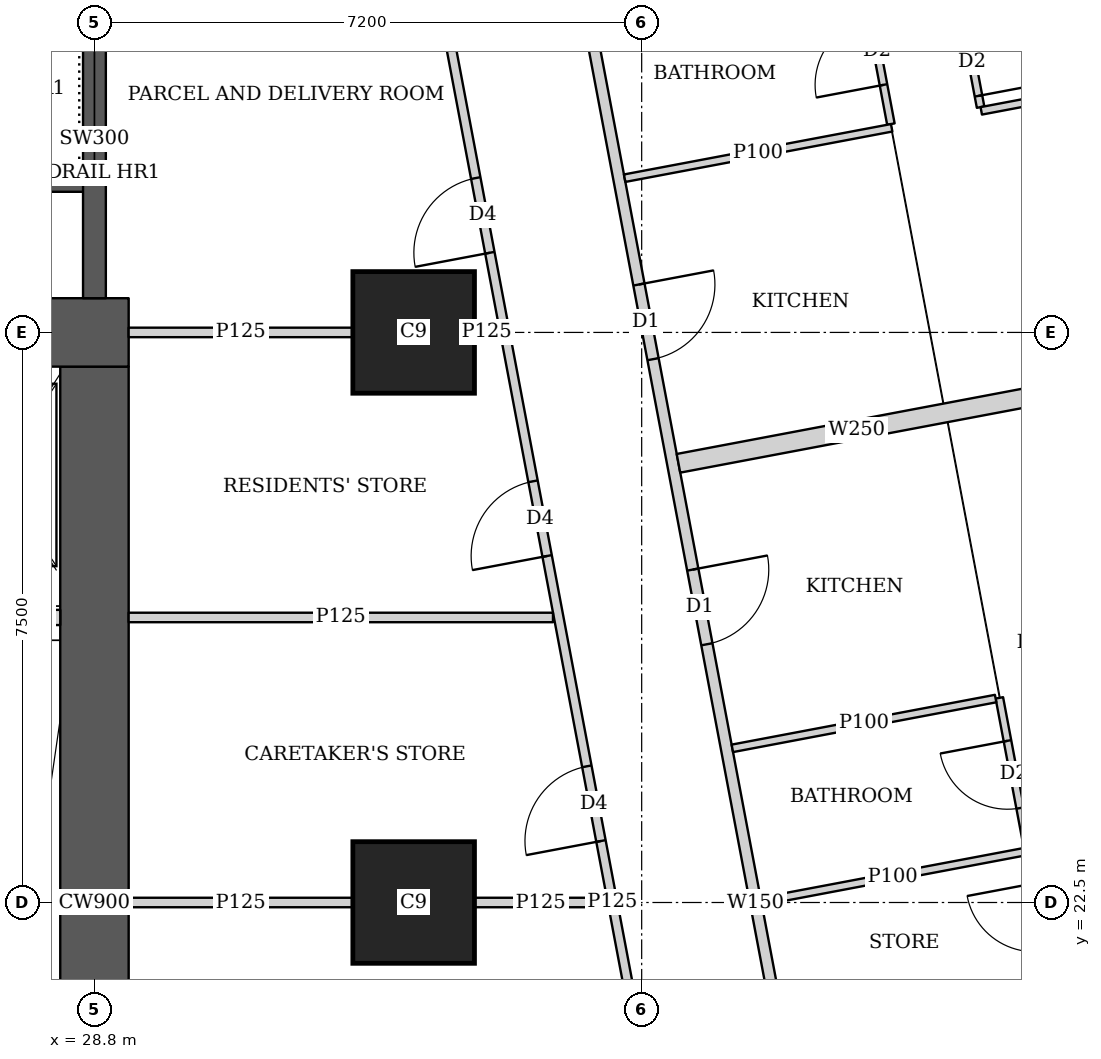
"""IFC4 building model, lengths in metres.
Left out: names, types, materials, properties, quantities, classifications, styles, units other than length and angle.
Written with IfcOpenShell. Run it as: python <this file> out.ifc"""

import sys

from ifc_helpers import new_model, si_unit, direction, frame, frame_2d, origin, origin_2d, place, context, subcontext, project, spatial, rectangle, extrude, element, fill, save


model = new_model("IFC4")
c1 = context("Model", 3, precision=1e-05, world=origin(), true_north=direction((0.0, 1.0)))
c2 = subcontext(c1, "Body", "Model", "MODEL_VIEW")
j1 = project(units=[si_unit("LENGTHUNIT", "METRE"), si_unit("PLANEANGLEUNIT", "RADIAN")], contexts=[c1])
p1 = place(None, origin())
s1 = spatial("IfcSite", under=j1, at=p1, CompositionType="ELEMENT")
p2 = place(p1, origin())
s2 = spatial("IfcBuilding", under=s1, at=p2, CompositionType="ELEMENT")
p3 = place(p2, frame((0.0, 0.0, 89.15)))
s3 = spatial("IfcBuildingStorey", under=s2, at=p3, CompositionType="ELEMENT", Elevation=89.15)
for number, where, z_axis, x_axis in (
    (1, (33.0, 22.5, 0.0), (0.0, 0.0, 1.0), (1.0, 0.0, 0.0)),
    (2, (33.0, 30.0, 0.0), (0.0, 0.0, 1.0), (1.0, 0.0, 0.0)),
):
    element("IfcColumn", number, at=place(p3, frame(where, z_axis=z_axis, x_axis=x_axis)), inside=s3, PredefinedType="COLUMN", context=c2, shape_type="SweptSolid", body=[
        extrude(rectangle(XDim=1.6, YDim=1.6, at=origin_2d()), origin(), (0.0, 0.0, 1.0), 3.75),
    ])
p4 = place(p3, frame((13.95, 30.0, 0.0), z_axis=(0.0, 0.0, 1.0), x_axis=(1.0, 0.0, 0.0)))
e3 = element("IfcWall", 3, at=p4, inside=s3, PredefinedType="SHEAR", context=c2, shape_type="SweptSolid", body=[
    extrude(rectangle(XDim=15.3, YDim=0.9, at=frame_2d((7.65, 0.0))), origin(), (0.0, 0.0, 1.0), 3.75),
])
p5 = place(p4, frame((4.45, 0.0, 0.0)))
e4 = element("IfcOpeningElement", 4, at=p5, cuts=e3, PredefinedType="OPENING", context=c2, shape_type="SweptSolid", body=[
    extrude(rectangle(XDim=1.8, YDim=2.1, at=frame_2d((0.9, 1.05))), frame((0.0, 0.46, 0.0), z_axis=(0.0, -1.0, 0.0), x_axis=(1.0, 0.0, 0.0)), (0.0, 0.0, 1.0), 0.92),
])
p6 = place(p4, frame((10.7, 0.0, 0.0)))
e5 = element("IfcOpeningElement", 5, at=p6, cuts=e3, PredefinedType="OPENING", context=c2, shape_type="SweptSolid", body=[
    extrude(rectangle(XDim=1.1, YDim=2.1, at=frame_2d((0.55, 1.05))), frame((0.0, 0.46, 0.0), z_axis=(0.0, -1.0, 0.0), x_axis=(1.0, 0.0, 0.0)), (0.0, 0.0, 1.0), 0.92),
])
p7 = place(p3, frame((28.8, 15.45, 0.0), z_axis=(0.0, 0.0, 1.0), x_axis=(0.0, 1.0, 0.0)))
e6 = element("IfcWall", 6, at=p7, inside=s3, PredefinedType="SHEAR", context=c2, shape_type="SweptSolid", body=[
    extrude(rectangle(XDim=14.1, YDim=0.9, at=frame_2d((7.05, 0.0))), origin(), (0.0, 0.0, 1.0), 3.75),
])
p8 = place(p3, frame((28.8, 30.45, 0.0), z_axis=(0.0, 0.0, 1.0), x_axis=(0.0, 1.0, 0.0)))
e7 = element("IfcWall", 7, at=p8, inside=s3, PredefinedType="SHEAR", context=c2, shape_type="SweptSolid", body=[
    extrude(rectangle(XDim=4.2, YDim=0.3, at=frame_2d((2.1, 0.0))), origin(), (0.0, 0.0, 1.0), 3.75),
])
p9 = place(p3, frame((33.127, 45.65, 0.0), z_axis=(0.0, 0.0, 1.0), x_axis=(0.185598547723, -0.98262565562, 0.0)))
e8 = element("IfcWall", 8, at=p9, inside=s3, PredefinedType="SOLIDWALL", context=c2, shape_type="SweptSolid", body=[
    extrude(rectangle(XDim=47.118, YDim=0.15, at=frame_2d((23.559, 0.0))), origin(), (0.0, 0.0, 1.0), 2.2),
])
p10 = place(p9, frame((15.285, 0.0, 0.0)))
e9 = element("IfcOpeningElement", 9, at=p10, cuts=e8, PredefinedType="OPENING", context=c2, shape_type="SweptSolid", body=[
    extrude(rectangle(XDim=1.0, YDim=2.1, at=frame_2d((0.5, 1.05))), frame((0.0, 0.085, 0.0), z_axis=(0.0, -1.0, 0.0), x_axis=(1.0, 0.0, 0.0)), (0.0, 0.0, 1.0), 0.17),
])
p11 = place(p9, frame((19.102, 0.0, 0.0)))
e10 = element("IfcOpeningElement", 10, at=p11, cuts=e8, PredefinedType="OPENING", context=c2, shape_type="SweptSolid", body=[
    extrude(rectangle(XDim=1.0, YDim=2.1, at=frame_2d((0.5, 1.05))), frame((0.0, 0.085, 0.0), z_axis=(0.0, -1.0, 0.0), x_axis=(1.0, 0.0, 0.0)), (0.0, 0.0, 1.0), 0.17),
])
p12 = place(p9, frame((33.88, 0.0, 0.0)))
e11 = element("IfcOpeningElement", 11, at=p12, cuts=e8, PredefinedType="OPENING", context=c2, shape_type="SweptSolid", body=[
    extrude(rectangle(XDim=1.0, YDim=2.1, at=frame_2d((0.5, 1.05))), frame((0.0, 0.085, 0.0), z_axis=(0.0, -1.0, 0.0), x_axis=(1.0, 0.0, 0.0)), (0.0, 0.0, 1.0), 0.17),
])
p13 = place(p3, frame((38.862, 41.42, 0.0), z_axis=(0.0, 0.0, 1.0), x_axis=(0.185574815416, -0.982630137887, 0.0)))
e12 = element("IfcWall", 12, at=p13, inside=s3, PredefinedType="PARTITIONING", context=c2, shape_type="SweptSolid", body=[
    extrude(rectangle(XDim=8.605, YDim=0.1, at=frame_2d((4.303, 0.0))), origin(), (0.0, 0.0, 1.0), 3.5),
])
p14 = place(p13, frame((7.555, 0.0, 0.0)))
e13 = element("IfcOpeningElement", 13, at=p14, cuts=e12, PredefinedType="OPENING", context=c2, shape_type="SweptSolid", body=[
    extrude(rectangle(XDim=0.9, YDim=2.1, at=frame_2d((0.45, 1.05))), frame((0.0, 0.06, 0.0), z_axis=(0.0, -1.0, 0.0), x_axis=(1.0, 0.0, 0.0)), (0.0, 0.0, 1.0), 0.12),
])
p15 = place(p13, frame((3.579, 0.0, 0.0)))
e14 = element("IfcOpeningElement", 14, at=p15, cuts=e12, PredefinedType="OPENING", context=c2, shape_type="SweptSolid", body=[
    extrude(rectangle(XDim=0.9, YDim=2.1, at=frame_2d((0.45, 1.05))), frame((0.0, 0.06, 0.0), z_axis=(0.0, -1.0, 0.0), x_axis=(1.0, 0.0, 0.0)), (0.0, 0.0, 1.0), 0.12),
])
p16 = place(p3, frame((37.473, 42.309, 0.0), z_axis=(0.0, 0.0, 1.0), x_axis=(0.185491912953, -0.982645790827, 0.0)))
e15 = element("IfcWall", 15, at=p16, inside=s3, PredefinedType="PARTITIONING", context=c2, shape_type="SweptSolid", body=[
    extrude(rectangle(XDim=9.737, YDim=0.1, at=frame_2d((4.869, 0.0))), origin(), (0.0, 0.0, 1.0), 3.5),
])
p17 = place(p16, frame((8.312, 0.0, 0.0)))
e16 = element("IfcOpeningElement", 16, at=p17, cuts=e15, PredefinedType="OPENING", context=c2, shape_type="SweptSolid", body=[
    extrude(rectangle(XDim=0.9, YDim=2.1, at=frame_2d((0.45, 1.05))), frame((0.0, 0.06, 0.0), z_axis=(0.0, -1.0, 0.0), x_axis=(1.0, 0.0, 0.0)), (0.0, 0.0, 1.0), 0.12),
])
p18 = place(p16, frame((2.853, 0.0, 0.0)))
e17 = element("IfcOpeningElement", 17, at=p18, cuts=e15, PredefinedType="OPENING", context=c2, shape_type="SweptSolid", body=[
    extrude(rectangle(XDim=0.9, YDim=2.1, at=frame_2d((0.45, 1.05))), frame((0.0, 0.06, 0.0), z_axis=(0.0, -1.0, 0.0), x_axis=(1.0, 0.0, 0.0)), (0.0, 0.0, 1.0), 0.12),
])
p19 = place(p16, frame((5.644, 0.0, 0.0)))
e18 = element("IfcOpeningElement", 18, at=p19, cuts=e15, PredefinedType="OPENING", context=c2, shape_type="SweptSolid", body=[
    extrude(rectangle(XDim=0.9, YDim=2.1, at=frame_2d((0.45, 1.05))), frame((0.0, 0.06, 0.0), z_axis=(0.0, -1.0, 0.0), x_axis=(1.0, 0.0, 0.0)), (0.0, 0.0, 1.0), 0.12),
])
p20 = place(p3, frame((44.693, 33.713, 0.0), z_axis=(0.0, 0.0, 1.0), x_axis=(-0.982633535512, -0.185556823879, 0.0)))
e19 = element("IfcWall", 19, at=p20, inside=s3, PredefinedType="PARTITIONING", context=c2, shape_type="SweptSolid", body=[
    extrude(rectangle(XDim=4.3, YDim=0.1, at=frame_2d((2.15, 0.0))), origin(), (0.0, 0.0, 1.0), 2.2),
])
p21 = place(p3, frame((39.289, 32.692, 0.0), z_axis=(0.0, 0.0, 1.0), x_axis=(-0.982662827464, -0.185401638399, 0.0)))
e20 = element("IfcWall", 20, at=p21, inside=s3, PredefinedType="PARTITIONING", context=c2, shape_type="SweptSolid", body=[
    extrude(rectangle(XDim=3.575, YDim=0.1, at=frame_2d((1.788, 0.0))), origin(), (0.0, 0.0, 1.0), 3.5),
])
p22 = place(p3, frame((40.706, 25.192, 0.0), z_axis=(0.0, 0.0, 1.0), x_axis=(0.185591412258, -0.982627003342, 0.0)))
e21 = element("IfcWall", 21, at=p22, inside=s3, PredefinedType="PARTITIONING", context=c2, shape_type="SweptSolid", body=[
    extrude(rectangle(XDim=9.548, YDim=0.1, at=frame_2d((4.774, 0.0))), origin(), (0.0, 0.0, 1.0), 2.5),
])
p23 = place(p22, frame((0.575, 0.0, 0.0)))
e22 = element("IfcOpeningElement", 22, at=p23, cuts=e21, PredefinedType="OPENING", context=c2, shape_type="SweptSolid", body=[
    extrude(rectangle(XDim=0.9, YDim=2.1, at=frame_2d((0.45, 1.05))), frame((0.0, 0.06, 0.0), z_axis=(0.0, -1.0, 0.0), x_axis=(1.0, 0.0, 0.0)), (0.0, 0.0, 1.0), 0.12),
])
p24 = place(p22, frame((4.166, 0.0, 0.0)))
e23 = element("IfcOpeningElement", 23, at=p24, cuts=e21, PredefinedType="OPENING", context=c2, shape_type="SweptSolid", body=[
    extrude(rectangle(XDim=0.9, YDim=2.1, at=frame_2d((0.45, 1.05))), frame((0.0, 0.06, 0.0), z_axis=(0.0, -1.0, 0.0), x_axis=(1.0, 0.0, 0.0)), (0.0, 0.0, 1.0), 0.12),
])
p25 = place(p22, frame((2.483, 0.0, 0.0)))
e24 = element("IfcOpeningElement", 24, at=p25, cuts=e21, PredefinedType="OPENING", context=c2, shape_type="SweptSolid", body=[
    extrude(rectangle(XDim=0.9, YDim=2.1, at=frame_2d((0.45, 1.05))), frame((0.0, 0.06, 0.0), z_axis=(0.0, -1.0, 0.0), x_axis=(1.0, 0.0, 0.0)), (0.0, 0.0, 1.0), 0.12),
])
p26 = place(p22, frame((6.074, 0.0, 0.0)))
e25 = element("IfcOpeningElement", 25, at=p26, cuts=e21, PredefinedType="OPENING", context=c2, shape_type="SweptSolid", body=[
    extrude(rectangle(XDim=0.9, YDim=2.1, at=frame_2d((0.45, 1.05))), frame((0.0, 0.06, 0.0), z_axis=(0.0, -1.0, 0.0), x_axis=(1.0, 0.0, 0.0)), (0.0, 0.0, 1.0), 0.12),
])
p27 = place(p3, frame((40.657, 25.183, 0.0), z_axis=(0.0, 0.0, 1.0), x_axis=(-0.982585626838, -0.185810349366, 0.0)))
e26 = element("IfcWall", 26, at=p27, inside=s3, PredefinedType="PARTITIONING", context=c2, shape_type="SweptSolid", body=[
    extrude(rectangle(XDim=3.525, YDim=0.1, at=frame_2d((1.763, 0.0))), origin(), (0.0, 0.0, 1.0), 3.5),
])
p28 = place(p3, frame((41.037, 23.168, 0.0), z_axis=(0.0, 0.0, 1.0), x_axis=(-0.982638553676, -0.185530247748, 0.0)))
e27 = element("IfcWall", 27, at=p28, inside=s3, PredefinedType="PARTITIONING", context=c2, shape_type="SweptSolid", body=[
    extrude(rectangle(XDim=3.525, YDim=0.1, at=frame_2d((1.763, 0.0))), origin(), (0.0, 0.0, 1.0), 2.5),
])
p29 = place(p3, frame((41.177, 29.164, 0.0), z_axis=(0.0, 0.0, 1.0), x_axis=(-0.982642846239, -0.185507511263, 0.0)))
e28 = element("IfcWall", 28, at=p29, inside=s3, PredefinedType="SOLIDWALL", context=c2, shape_type="SweptSolid", body=[
    extrude(rectangle(XDim=4.776, YDim=0.25, at=frame_2d((2.388, 0.0))), origin(), (0.0, 0.0, 1.0), 2.5),
])
p30 = place(p3, frame((37.9, 10.413, 0.0), z_axis=(0.0, 0.0, 1.0), x_axis=(-0.185589740669, 0.982627319058, 0.0)))
e29 = element("IfcWall", 29, at=p30, inside=s3, PredefinedType="PARTITIONING", context=c2, shape_type="SweptSolid", body=[
    extrude(rectangle(XDim=24.602, YDim=0.125, at=frame_2d((12.301, 0.0))), origin(), (0.0, 0.0, 1.0), 2.5),
])
p31 = place(p30, frame((0.708, 0.0, 0.0)))
e30 = element("IfcOpeningElement", 30, at=p31, cuts=e29, PredefinedType="OPENING", context=c2, shape_type="SweptSolid", body=[
    extrude(rectangle(XDim=1.0, YDim=2.1, at=frame_2d((0.5, 1.05))), frame((0.0, 0.073, 0.0), z_axis=(0.0, -1.0, 0.0), x_axis=(1.0, 0.0, 0.0)), (0.0, 0.0, 1.0), 0.145),
])
p32 = place(p30, frame((5.75, 0.0, 0.0)))
e31 = element("IfcOpeningElement", 31, at=p32, cuts=e29, PredefinedType="OPENING", context=c2, shape_type="SweptSolid", body=[
    extrude(rectangle(XDim=1.0, YDim=2.1, at=frame_2d((0.5, 1.05))), frame((0.0, 0.073, 0.0), z_axis=(0.0, -1.0, 0.0), x_axis=(1.0, 0.0, 0.0)), (0.0, 0.0, 1.0), 0.145),
])
p33 = place(p30, frame((13.124, 0.0, 0.0)))
e32 = element("IfcOpeningElement", 32, at=p33, cuts=e29, PredefinedType="OPENING", context=c2, shape_type="SweptSolid", body=[
    extrude(rectangle(XDim=1.0, YDim=2.1, at=frame_2d((0.5, 1.05))), frame((0.0, 0.073, 0.0), z_axis=(0.0, -1.0, 0.0), x_axis=(1.0, 0.0, 0.0)), (0.0, 0.0, 1.0), 0.145),
])
p34 = place(p30, frame((16.94, 0.0, 0.0)))
e33 = element("IfcOpeningElement", 33, at=p34, cuts=e29, PredefinedType="OPENING", context=c2, shape_type="SweptSolid", body=[
    extrude(rectangle(XDim=1.0, YDim=2.1, at=frame_2d((0.5, 1.05))), frame((0.0, 0.073, 0.0), z_axis=(0.0, -1.0, 0.0), x_axis=(1.0, 0.0, 0.0)), (0.0, 0.0, 1.0), 0.145),
])
p35 = place(p30, frame((21.0, 0.0, 0.0)))
e34 = element("IfcOpeningElement", 34, at=p35, cuts=e29, PredefinedType="OPENING", context=c2, shape_type="SweptSolid", body=[
    extrude(rectangle(XDim=1.0, YDim=2.1, at=frame_2d((0.5, 1.05))), frame((0.0, 0.073, 0.0), z_axis=(0.0, -1.0, 0.0), x_axis=(1.0, 0.0, 0.0)), (0.0, 0.0, 1.0), 0.145),
])
p36 = place(p3, frame((29.25, 22.5, 0.0), z_axis=(0.0, 0.0, 1.0), x_axis=(1.0, 0.0, 0.0)))
e35 = element("IfcWall", 35, at=p36, inside=s3, PredefinedType="PARTITIONING", context=c2, shape_type="SweptSolid", body=[
    extrude(rectangle(XDim=2.949, YDim=0.125, at=frame_2d((1.475, 0.0))), origin(), (0.0, 0.0, 1.0), 3.5),
])
p37 = place(p3, frame((33.801, 22.5, 0.0), z_axis=(0.0, 0.0, 1.0), x_axis=(1.0, 0.0, 0.0)))
e36 = element("IfcWall", 36, at=p37, inside=s3, PredefinedType="PARTITIONING", context=c2, shape_type="SweptSolid", body=[
    extrude(rectangle(XDim=1.741, YDim=0.125, at=frame_2d((0.871, 0.0))), origin(), (0.0, 0.0, 1.0), 2.5),
])
p38 = place(p3, frame((29.25, 26.25, 0.0), z_axis=(0.0, 0.0, 1.0), x_axis=(1.0, 0.0, 0.0)))
e37 = element("IfcWall", 37, at=p38, inside=s3, PredefinedType="PARTITIONING", context=c2, shape_type="SweptSolid", body=[
    extrude(rectangle(XDim=5.583, YDim=0.125, at=frame_2d((2.792, 0.0))), origin(), (0.0, 0.0, 1.0), 3.5),
])
p39 = place(p3, frame((29.25, 30.0, 0.0), z_axis=(0.0, 0.0, 1.0), x_axis=(1.0, 0.0, 0.0)))
e38 = element("IfcWall", 38, at=p39, inside=s3, PredefinedType="PARTITIONING", context=c2, shape_type="SweptSolid", body=[
    extrude(rectangle(XDim=2.949, YDim=0.125, at=frame_2d((1.475, 0.0))), origin(), (0.0, 0.0, 1.0), 3.5),
])
p40 = place(p3, frame((33.801, 30.0, 0.0), z_axis=(0.0, 0.0, 1.0), x_axis=(1.0, 0.0, 0.0)))
e39 = element("IfcWall", 39, at=p40, inside=s3, PredefinedType="PARTITIONING", context=c2, shape_type="SweptSolid", body=[
    extrude(rectangle(XDim=0.324, YDim=0.125, at=frame_2d((0.162, 0.0))), origin(), (0.0, 0.0, 1.0), 2.5),
])
p41 = place(p3, frame((23.0, 31.95, 0.0), z_axis=(0.0, 0.0, 1.0), x_axis=(1.0, 0.0, 0.0)))
e40 = element("IfcWall", 40, at=p41, inside=s3, PredefinedType="SHEAR", context=c2, shape_type="SweptSolid", body=[
    extrude(rectangle(XDim=5.8, YDim=0.2, at=frame_2d((2.9, 0.0))), origin(), (0.0, 0.0, 1.0), 3.75),
])
p42 = place(p3, frame((27.4, 26.25, 0.0), z_axis=(0.0, 0.0, 1.0), x_axis=(1.0, 0.0, 0.0)))
e41 = element("IfcWall", 41, at=p42, inside=s3, PredefinedType="SOLIDWALL", context=c2, shape_type="SweptSolid", body=[
    extrude(rectangle(XDim=0.95, YDim=0.2, at=frame_2d((0.475, 0.0))), origin(), (0.0, 0.0, 1.0), 3.5),
])
p43 = place(p14, origin())
e42 = element("IfcDoor", 42, at=p43, inside=s3, OperationType="SINGLE_SWING_RIGHT", PredefinedType="DOOR", context=c2, shape_type="SweptSolid", body=[
    extrude(rectangle(XDim=0.9, YDim=2.1, at=frame_2d((0.45, 1.05))), frame((0.0, 0.025, 0.0), z_axis=(0.0, -1.0, 0.0), x_axis=(1.0, 0.0, 0.0)), (0.0, 0.0, 1.0), 0.05),
])
fill(e13, e42)
p44 = place(p17, origin())
e43 = element("IfcDoor", 43, at=p44, inside=s3, OperationType="SINGLE_SWING_LEFT", PredefinedType="DOOR", context=c2, shape_type="SweptSolid", body=[
    extrude(rectangle(XDim=0.9, YDim=2.1, at=frame_2d((0.45, 1.05))), frame((0.0, 0.025, 0.0), z_axis=(0.0, -1.0, 0.0), x_axis=(1.0, 0.0, 0.0)), (0.0, 0.0, 1.0), 0.05),
])
fill(e16, e43)
p45 = place(p10, origin())
e44 = element("IfcDoor", 44, at=p45, inside=s3, OperationType="SINGLE_SWING_LEFT", PredefinedType="DOOR", context=c2, shape_type="SweptSolid", body=[
    extrude(rectangle(XDim=1.0, YDim=2.1, at=frame_2d((0.5, 1.05))), frame((0.0, 0.025, 0.0), z_axis=(0.0, -1.0, 0.0), x_axis=(1.0, 0.0, 0.0)), (0.0, 0.0, 1.0), 0.05),
])
fill(e9, e44)
p46 = place(p23, origin())
e45 = element("IfcDoor", 45, at=p46, inside=s3, OperationType="SINGLE_SWING_RIGHT", PredefinedType="DOOR", context=c2, shape_type="SweptSolid", body=[
    extrude(rectangle(XDim=0.9, YDim=2.1, at=frame_2d((0.45, 1.05))), frame((0.0, 0.025, 0.0), z_axis=(0.0, -1.0, 0.0), x_axis=(1.0, 0.0, 0.0)), (0.0, 0.0, 1.0), 0.05),
])
fill(e22, e45)
p47 = place(p11, origin())
e46 = element("IfcDoor", 46, at=p47, inside=s3, OperationType="SINGLE_SWING_LEFT", PredefinedType="DOOR", context=c2, shape_type="SweptSolid", body=[
    extrude(rectangle(XDim=1.0, YDim=2.1, at=frame_2d((0.5, 1.05))), frame((0.0, 0.025, 0.0), z_axis=(0.0, -1.0, 0.0), x_axis=(1.0, 0.0, 0.0)), (0.0, 0.0, 1.0), 0.05),
])
fill(e10, e46)
p48 = place(p33, origin())
e47 = element("IfcDoor", 47, at=p48, inside=s3, OperationType="SINGLE_SWING_LEFT", PredefinedType="DOOR", context=c2, shape_type="SweptSolid", body=[
    extrude(rectangle(XDim=1.0, YDim=2.1, at=frame_2d((0.5, 1.05))), frame((0.0, 0.025, 0.0), z_axis=(0.0, -1.0, 0.0), x_axis=(1.0, 0.0, 0.0)), (0.0, 0.0, 1.0), 0.05),
])
fill(e32, e47)
p49 = place(p34, origin())
e48 = element("IfcDoor", 48, at=p49, inside=s3, OperationType="SINGLE_SWING_LEFT", PredefinedType="DOOR", context=c2, shape_type="SweptSolid", body=[
    extrude(rectangle(XDim=1.0, YDim=2.1, at=frame_2d((0.5, 1.05))), frame((0.0, 0.025, 0.0), z_axis=(0.0, -1.0, 0.0), x_axis=(1.0, 0.0, 0.0)), (0.0, 0.0, 1.0), 0.05),
])
fill(e33, e48)
p50 = place(p35, origin())
e49 = element("IfcDoor", 49, at=p50, inside=s3, OperationType="SINGLE_SWING_LEFT", PredefinedType="DOOR", context=c2, shape_type="SweptSolid", body=[
    extrude(rectangle(XDim=1.0, YDim=2.1, at=frame_2d((0.5, 1.05))), frame((0.0, 0.025, 0.0), z_axis=(0.0, -1.0, 0.0), x_axis=(1.0, 0.0, 0.0)), (0.0, 0.0, 1.0), 0.05),
])
fill(e34, e49)
save(model, sys.argv[1])
